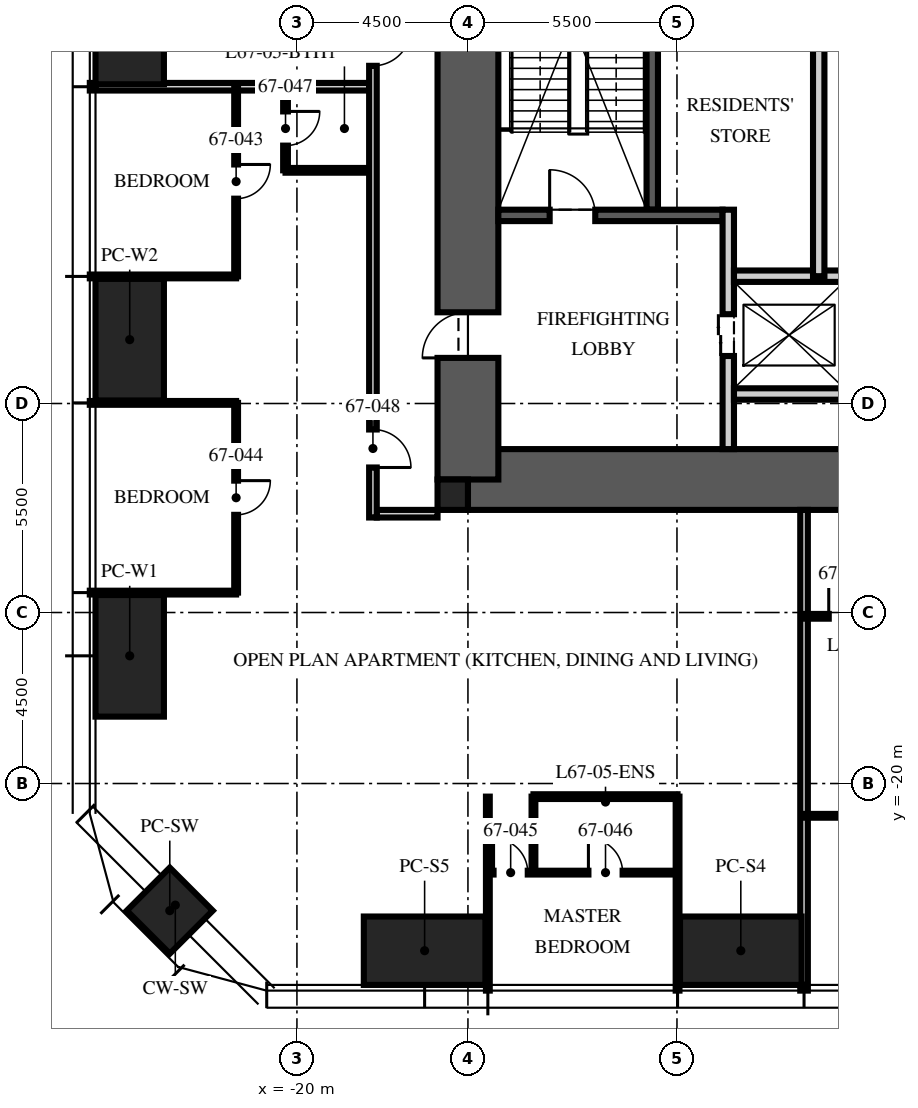
"""IFC4 building model, lengths in metres.
Left out: names, types, materials, properties, quantities, classifications, styles, units other than length and angle.
Written with IfcOpenShell. Run it as: python <this file> out.ifc"""

import sys

from ifc_helpers import new_model, si_unit, direction, frame, frame_2d, origin, origin_2d, place, context, subcontext, project, spatial, rectangle, hollow_rectangle, extrude, element, fill, save


model = new_model("IFC4")
c1 = context("Model", 3, precision=1e-05, world=origin(), true_north=direction((0.0, 1.0)))
c2 = subcontext(c1, "Body", "Model", "MODEL_VIEW")
j1 = project(units=[si_unit("LENGTHUNIT", "METRE"), si_unit("PLANEANGLEUNIT", "RADIAN")], contexts=[c1])
p1 = place(None, origin())
s1 = spatial("IfcSite", under=j1, at=p1, CompositionType="ELEMENT")
p2 = place(p1, origin())
s2 = spatial("IfcBuilding", under=s1, at=p2, CompositionType="ELEMENT")
p3 = place(p2, frame((0.0, 0.0, 267.0)))
s3 = spatial("IfcBuildingStorey", under=s2, at=p3, CompositionType="ELEMENT", Elevation=267.0)
p4 = place(p3, frame((-15.5, -12.0, -0.25), z_axis=(0.0, 0.0, 1.0), x_axis=(1.0, 0.0, 0.0)))
e1 = element("IfcWall", 1, at=p4, inside=s3, PredefinedType="SHEAR", context=c2, shape_type="SweptSolid", body=[
    extrude(rectangle(XDim=31.0, YDim=1.6, at=frame_2d((15.5, 0.0))), origin(), (0.0, 0.0, 1.0), 3.75),
])
p5 = place(p3, frame((-15.5, -12.0, -0.25), z_axis=(0.0, 0.0, 1.0), x_axis=(0.0, 1.0, 0.0)))
e2 = element("IfcWall", 2, at=p5, inside=s3, PredefinedType="SHEAR", context=c2, shape_type="SweptSolid", body=[
    extrude(rectangle(XDim=24.0, YDim=1.6, at=frame_2d((12.0, 0.0))), origin(), (0.0, 0.0, 1.0), 3.75),
])
p6 = place(p5, frame((3.2, 0.0, 0.25)))
e3 = element("IfcOpeningElement", 3, at=p6, cuts=e2, PredefinedType="OPENING", context=c2, shape_type="SweptSolid", body=[
    extrude(rectangle(XDim=1.2, YDim=2.1, at=frame_2d((0.6, 1.05))), frame((0.0, 0.81, 0.0), z_axis=(0.0, -1.0, 0.0), x_axis=(1.0, 0.0, 0.0)), (0.0, 0.0, 1.0), 1.62),
])
p7 = place(p5, frame((19.3, 0.0, 0.25)))
e4 = element("IfcOpeningElement", 4, at=p7, cuts=e2, PredefinedType="OPENING", context=c2, shape_type="SweptSolid", body=[
    extrude(rectangle(XDim=1.8, YDim=2.1, at=frame_2d((0.9, 1.05))), frame((0.0, 0.81, 0.0), z_axis=(0.0, -1.0, 0.0), x_axis=(1.0, 0.0, 0.0)), (0.0, 0.0, 1.0), 1.62),
])
p8 = place(p3, frame((-15.9, -12.4, -0.25), z_axis=(0.0, 0.0, 1.0), x_axis=(1.0, 0.0, 0.0)))
e5 = element("IfcColumn", 5, at=p8, inside=s3, PredefinedType="COLUMN", context=c2, shape_type="SweptSolid", body=[
    extrude(rectangle(XDim=0.8, YDim=0.8, at=origin_2d()), origin(), (0.0, 0.0, 1.0), 3.75),
])
for number, where, z_axis, x_axis in (
    (6, (-8.32, -24.4, 0.0), (0.0, 0.0, 1.0), (1.0, 0.0, 0.0)),
    (7, (-16.64, -24.4, 0.0), (0.0, 0.0, 1.0), (1.0, 0.0, 0.0)),
    (8, (-24.4, -16.64, 0.0), (0.0, 0.0, 1.0), (0.0, 1.0, 0.0)),
    (9, (-24.4, -8.32, 0.0), (0.0, 0.0, 1.0), (0.0, 1.0, 0.0)),
    (10, (-24.4, 0.0, 0.0), (0.0, 0.0, 1.0), (0.0, 1.0, 0.0)),
):
    element("IfcColumn", number, at=place(p3, frame(where, z_axis=z_axis, x_axis=x_axis)), inside=s3, PredefinedType="COLUMN", context=c2, shape_type="SweptSolid", body=[
        extrude(hollow_rectangle(XDim=3.2, YDim=1.8, WallThickness=0.14, at=origin_2d()), origin(), (0.0, 0.0, 1.0), 3.75),
    ])
p9 = place(p3, frame((-23.346, -23.346, 0.0), z_axis=(0.0, 0.0, 1.0), x_axis=(0.707106781187, -0.707106781187, 0.0)))
e11 = element("IfcColumn", 11, at=p9, inside=s3, PredefinedType="COLUMN", context=c2, shape_type="SweptSolid", body=[
    extrude(hollow_rectangle(XDim=1.6, YDim=1.6, WallThickness=0.1, at=origin_2d()), origin(), (0.0, 0.0, 1.0), 3.75),
])
p10 = place(p3, frame((-10.65, -4.9, 0.0), z_axis=(0.0, 0.0, 1.0), x_axis=(0.0, 1.0, 0.0)))
e12 = element("IfcWall", 12, at=p10, inside=s3, PredefinedType="SOLIDWALL", context=c2, shape_type="SweptSolid", body=[
    extrude(rectangle(XDim=10.1, YDim=0.3, at=frame_2d((5.05, 0.0))), origin(), (0.0, 0.0, 1.0), 3.5),
])
p11 = place(p3, frame((-14.7, -5.05, 0.0), z_axis=(0.0, 0.0, 1.0), x_axis=(1.0, 0.0, 0.0)))
e13 = element("IfcWall", 13, at=p11, inside=s3, PredefinedType="SOLIDWALL", context=c2, shape_type="SweptSolid", body=[
    extrude(rectangle(XDim=5.9, YDim=0.3, at=frame_2d((2.95, 0.0))), origin(), (0.0, 0.0, 1.0), 3.5),
])
p12 = place(p11, frame((1.35, 0.0, 0.0)))
e14 = element("IfcOpeningElement", 14, at=p12, cuts=e13, PredefinedType="OPENING", context=c2, shape_type="SweptSolid", body=[
    extrude(rectangle(XDim=1.2, YDim=2.1, at=frame_2d((0.6, 1.05))), frame((0.0, 0.16, 0.0), z_axis=(0.0, -1.0, 0.0), x_axis=(1.0, 0.0, 0.0)), (0.0, 0.0, 1.0), 0.32),
])
p13 = place(p3, frame((-8.65, -11.2, 0.0), z_axis=(0.0, 0.0, 1.0), x_axis=(0.0, 1.0, 0.0)))
e15 = element("IfcWall", 15, at=p13, inside=s3, PredefinedType="PARTITIONING", context=c2, shape_type="SweptSolid", body=[
    extrude(rectangle(XDim=6.3, YDim=0.3, at=frame_2d((3.15, 0.0))), origin(), (0.0, 0.0, 1.0), 3.5),
])
p14 = place(p13, frame((2.45, 0.0, 0.0)))
e16 = element("IfcOpeningElement", 16, at=p14, cuts=e15, PredefinedType="OPENING", context=c2, shape_type="SweptSolid", body=[
    extrude(rectangle(XDim=1.1, YDim=2.1, at=frame_2d((0.55, 1.05))), frame((0.0, 0.16, 0.0), z_axis=(0.0, -1.0, 0.0), x_axis=(1.0, 0.0, 0.0)), (0.0, 0.0, 1.0), 0.32),
])
p15 = place(p3, frame((-8.5, -6.65, 0.0), z_axis=(0.0, 0.0, 1.0), x_axis=(1.0, 0.0, 0.0)))
e17 = element("IfcWall", 17, at=p15, inside=s3, PredefinedType="PARTITIONING", context=c2, shape_type="SweptSolid", body=[
    extrude(rectangle(XDim=17.0, YDim=0.3, at=frame_2d((8.5, 0.0))), origin(), (0.0, 0.0, 1.0), 3.5),
])
p16 = place(p15, frame((7.8, 0.0, 0.0)))
e18 = element("IfcOpeningElement", 18, at=p16, cuts=e17, PredefinedType="OPENING", context=c2, shape_type="SweptSolid", body=[
    extrude(rectangle(XDim=1.3, YDim=2.4, at=frame_2d((0.65, 1.2))), frame((0.0, 0.16, 0.0), z_axis=(0.0, -1.0, 0.0), x_axis=(1.0, 0.0, 0.0)), (0.0, 0.0, 1.0), 0.32),
])
p17 = place(p15, frame((5.65, 0.0, 0.0)))
e19 = element("IfcOpeningElement", 19, at=p17, cuts=e17, PredefinedType="OPENING", context=c2, shape_type="SweptSolid", body=[
    extrude(rectangle(XDim=0.9, YDim=2.1, at=frame_2d((0.45, 1.05))), frame((0.0, 0.16, 0.0), z_axis=(0.0, -1.0, 0.0), x_axis=(1.0, 0.0, 0.0)), (0.0, 0.0, 1.0), 0.32),
])
p18 = place(p15, frame((10.4, 0.0, 0.0)))
e20 = element("IfcOpeningElement", 20, at=p18, cuts=e17, PredefinedType="OPENING", context=c2, shape_type="SweptSolid", body=[
    extrude(rectangle(XDim=0.9, YDim=2.1, at=frame_2d((0.45, 1.05))), frame((0.0, 0.16, 0.0), z_axis=(0.0, -1.0, 0.0), x_axis=(1.0, 0.0, 0.0)), (0.0, 0.0, 1.0), 0.32),
])
p19 = place(p3, frame((-8.5, -9.75, 0.0), z_axis=(0.0, 0.0, 1.0), x_axis=(1.0, 0.0, 0.0)))
e21 = element("IfcWall", 21, at=p19, inside=s3, PredefinedType="PARTITIONING", context=c2, shape_type="SweptSolid", body=[
    extrude(rectangle(XDim=2.9, YDim=0.3, at=frame_2d((1.45, 0.0))), origin(), (0.0, 0.0, 1.0), 3.5),
])
p20 = place(p3, frame((-6.27, -6.65, 0.0), z_axis=(0.0, 0.0, 1.0), x_axis=(0.0, 1.0, 0.0)))
e22 = element("IfcWall", 22, at=p20, inside=s3, PredefinedType="PARTITIONING", context=c2, shape_type="SweptSolid", body=[
    extrude(rectangle(XDim=7.45, YDim=0.3, at=frame_2d((3.725, 0.0))), origin(), (0.0, 0.0, 1.0), 3.5),
])
p21 = place(p3, frame((-16.3, -12.9, 0.0), z_axis=(0.0, 0.0, 1.0), x_axis=(-1.0, 0.0, 0.0)))
e23 = element("IfcWall", 23, at=p21, inside=s3, PredefinedType="PARTITIONING", context=c2, shape_type="SweptSolid", body=[
    extrude(rectangle(XDim=1.6, YDim=0.2, at=frame_2d((0.8, 0.0))), origin(), (0.0, 0.0, 1.0), 2.3),
])
p22 = place(p3, frame((-18.1, -1.664, 0.0), z_axis=(0.0, 0.0, 1.0), x_axis=(-1.0, 0.0, 0.0)))
e24 = element("IfcWall", 24, at=p22, inside=s3, PredefinedType="PARTITIONING", context=c2, shape_type="SweptSolid", body=[
    extrude(rectangle(XDim=7.35, YDim=0.2, at=frame_2d((3.675, 0.0))), origin(), (0.0, 0.0, 1.0), 2.91),
])
for number, where, z_axis, x_axis in (
    (25, (-21.6, -6.656, 0.0), (0.0, 0.0, 1.0), (-1.0, 0.0, 0.0)),
    (26, (-21.6, -9.984, 0.0), (0.0, 0.0, 1.0), (-1.0, 0.0, 0.0)),
    (27, (-21.6, -14.976, 0.0), (0.0, 0.0, 1.0), (-1.0, 0.0, 0.0)),
):
    element("IfcWall", number, at=place(p3, frame(where, z_axis=z_axis, x_axis=x_axis)), inside=s3, PredefinedType="PARTITIONING", context=c2, shape_type="SweptSolid", body=[
        extrude(rectangle(XDim=3.85, YDim=0.1, at=frame_2d((1.925, 0.0))), origin(), (0.0, 0.0, 1.0), 2.91),
    ])
for number, where, z_axis, x_axis in (
    (28, (-14.976, -20.345, 0.0), (0.0, 0.0, 1.0), (0.0, -1.0, 0.0)),
    (29, (-9.984, -20.345, 0.0), (0.0, 0.0, 1.0), (0.0, -1.0, 0.0)),
):
    element("IfcWall", number, at=place(p3, frame(where, z_axis=z_axis, x_axis=x_axis)), inside=s3, PredefinedType="PARTITIONING", context=c2, shape_type="SweptSolid", body=[
        extrude(rectangle(XDim=5.105, YDim=0.1, at=frame_2d((2.552, 0.0))), origin(), (0.0, 0.0, 1.0), 2.91),
    ])
p23 = place(p3, frame((-6.656, -12.8, 0.0), z_axis=(0.0, 0.0, 1.0), x_axis=(0.0, -1.0, 0.0)))
e30 = element("IfcWall", 30, at=p23, inside=s3, PredefinedType="PARTITIONING", context=c2, shape_type="SweptSolid", body=[
    extrude(rectangle(XDim=12.65, YDim=0.2, at=frame_2d((6.325, 0.0))), origin(), (0.0, 0.0, 1.0), 2.91),
])
p24 = place(p3, frame((-21.6, -1.664, 0.0), z_axis=(0.0, 0.0, 1.0), x_axis=(0.0, -1.0, 0.0)))
e31 = element("IfcWall", 31, at=p24, inside=s3, PredefinedType="PARTITIONING", context=c2, shape_type="SweptSolid", body=[
    extrude(rectangle(XDim=4.992, YDim=0.1, at=frame_2d((2.496, 0.0))), origin(), (0.0, 0.0, 1.0), 2.81),
])
p25 = place(p24, frame((2.046, 0.0, 0.0)))
e32 = element("IfcOpeningElement", 32, at=p25, cuts=e31, PredefinedType="OPENING", context=c2, shape_type="SweptSolid", body=[
    extrude(rectangle(XDim=0.9, YDim=2.1, at=frame_2d((0.45, 1.05))), frame((0.0, 0.06, 0.0), z_axis=(0.0, -1.0, 0.0), x_axis=(1.0, 0.0, 0.0)), (0.0, 0.0, 1.0), 0.12),
])
p26 = place(p3, frame((-21.6, -9.984, 0.0), z_axis=(0.0, 0.0, 1.0), x_axis=(0.0, -1.0, 0.0)))
e33 = element("IfcWall", 33, at=p26, inside=s3, PredefinedType="PARTITIONING", context=c2, shape_type="SweptSolid", body=[
    extrude(rectangle(XDim=4.992, YDim=0.1, at=frame_2d((2.496, 0.0))), origin(), (0.0, 0.0, 1.0), 2.81),
])
p27 = place(p26, frame((2.046, 0.0, 0.0)))
e34 = element("IfcOpeningElement", 34, at=p27, cuts=e33, PredefinedType="OPENING", context=c2, shape_type="SweptSolid", body=[
    extrude(rectangle(XDim=0.9, YDim=2.1, at=frame_2d((0.45, 1.05))), frame((0.0, 0.06, 0.0), z_axis=(0.0, -1.0, 0.0), x_axis=(1.0, 0.0, 0.0)), (0.0, 0.0, 1.0), 0.12),
])
p28 = place(p3, frame((-14.976, -22.345, 0.0), z_axis=(0.0, 0.0, 1.0), x_axis=(1.0, 0.0, 0.0)))
e35 = element("IfcWall", 35, at=p28, inside=s3, PredefinedType="PARTITIONING", context=c2, shape_type="SweptSolid", body=[
    extrude(rectangle(XDim=4.992, YDim=0.1, at=frame_2d((2.496, 0.0))), origin(), (0.0, 0.0, 1.0), 2.81),
])
p29 = place(p28, frame((0.15, 0.0, 0.0)))
e36 = element("IfcOpeningElement", 36, at=p29, cuts=e35, PredefinedType="OPENING", context=c2, shape_type="SweptSolid", body=[
    extrude(rectangle(XDim=0.9, YDim=2.1, at=frame_2d((0.45, 1.05))), frame((0.0, 0.06, 0.0), z_axis=(0.0, -1.0, 0.0), x_axis=(1.0, 0.0, 0.0)), (0.0, 0.0, 1.0), 0.12),
])
p30 = place(p28, frame((2.646, 0.0, 0.0)))
e37 = element("IfcOpeningElement", 37, at=p30, cuts=e35, PredefinedType="OPENING", context=c2, shape_type="SweptSolid", body=[
    extrude(rectangle(XDim=0.9, YDim=2.1, at=frame_2d((0.45, 1.05))), frame((0.0, 0.06, 0.0), z_axis=(0.0, -1.0, 0.0), x_axis=(1.0, 0.0, 0.0)), (0.0, 0.0, 1.0), 0.12),
])
p31 = place(p3, frame((-13.776, -20.345, 0.0), z_axis=(0.0, 0.0, 1.0), x_axis=(0.0, -1.0, 0.0)))
e38 = element("IfcWall", 38, at=p31, inside=s3, PredefinedType="PARTITIONING", context=c2, shape_type="SweptSolid", body=[
    extrude(rectangle(XDim=2.0, YDim=0.1, at=frame_2d((1.0, 0.0))), origin(), (0.0, 0.0, 1.0), 3.5),
])
p32 = place(p3, frame((-13.776, -20.345, 0.0), z_axis=(0.0, 0.0, 1.0), x_axis=(1.0, 0.0, 0.0)))
e39 = element("IfcWall", 39, at=p32, inside=s3, PredefinedType="PARTITIONING", context=c2, shape_type="SweptSolid", body=[
    extrude(rectangle(XDim=3.792, YDim=0.125, at=frame_2d((1.896, 0.0))), origin(), (0.0, 0.0, 1.0), 2.81),
])
p33 = place(p3, frame((-20.3, -1.664, 0.0), z_axis=(0.0, 0.0, 1.0), x_axis=(0.0, -1.0, 0.0)))
e40 = element("IfcWall", 40, at=p33, inside=s3, PredefinedType="PARTITIONING", context=c2, shape_type="SweptSolid", body=[
    extrude(rectangle(XDim=2.2, YDim=0.125, at=frame_2d((1.1, 0.0))), origin(), (0.0, 0.0, 1.0), 3.5),
])
p34 = place(p33, frame((0.65, 0.0, 0.0)))
e41 = element("IfcOpeningElement", 41, at=p34, cuts=e40, PredefinedType="OPENING", context=c2, shape_type="SweptSolid", body=[
    extrude(rectangle(XDim=0.9, YDim=2.1, at=frame_2d((0.45, 1.05))), frame((0.0, 0.073, 0.0), z_axis=(0.0, -1.0, 0.0), x_axis=(1.0, 0.0, 0.0)), (0.0, 0.0, 1.0), 0.145),
])
p35 = place(p3, frame((-18.1, -3.864, 0.0), z_axis=(0.0, 0.0, 1.0), x_axis=(-1.0, 0.0, 0.0)))
e42 = element("IfcWall", 42, at=p35, inside=s3, PredefinedType="PARTITIONING", context=c2, shape_type="SweptSolid", body=[
    extrude(rectangle(XDim=2.2, YDim=0.125, at=frame_2d((1.1, 0.0))), origin(), (0.0, 0.0, 1.0), 3.5),
])
p36 = place(p3, frame((-6.656, -20.85, 0.0), z_axis=(0.0, 0.0, 1.0), x_axis=(1.0, 0.0, 0.0)))
e43 = element("IfcWall", 43, at=p36, inside=s3, PredefinedType="PARTITIONING", context=c2, shape_type="SweptSolid", body=[
    extrude(rectangle(XDim=4.992, YDim=0.1, at=frame_2d((2.496, 0.0))), origin(), (0.0, 0.0, 1.0), 2.81),
])
p37 = place(p36, frame((2.046, 0.0, 0.0)))
e44 = element("IfcOpeningElement", 44, at=p37, cuts=e43, PredefinedType="OPENING", context=c2, shape_type="SweptSolid", body=[
    extrude(rectangle(XDim=0.9, YDim=2.1, at=frame_2d((0.45, 1.05))), frame((0.0, 0.06, 0.0), z_axis=(0.0, -1.0, 0.0), x_axis=(1.0, 0.0, 0.0)), (0.0, 0.0, 1.0), 0.12),
])
p38 = place(p3, frame((-6.656, -15.6, 0.0), z_axis=(0.0, 0.0, 1.0), x_axis=(1.0, 0.0, 0.0)))
e45 = element("IfcWall", 45, at=p38, inside=s3, PredefinedType="PARTITIONING", context=c2, shape_type="SweptSolid", body=[
    extrude(rectangle(XDim=6.2, YDim=0.125, at=frame_2d((3.1, 0.0))), origin(), (0.0, 0.0, 1.0), 2.81),
])
p39 = place(p38, frame((0.65, 0.0, 0.0)))
e46 = element("IfcOpeningElement", 46, at=p39, cuts=e45, PredefinedType="OPENING", context=c2, shape_type="SweptSolid", body=[
    extrude(rectangle(XDim=0.9, YDim=2.1, at=frame_2d((0.45, 1.05))), frame((0.0, 0.073, 0.0), z_axis=(0.0, -1.0, 0.0), x_axis=(1.0, 0.0, 0.0)), (0.0, 0.0, 1.0), 0.145),
])
p40 = place(p38, frame((2.85, 0.0, 0.0)))
e47 = element("IfcOpeningElement", 47, at=p40, cuts=e45, PredefinedType="OPENING", context=c2, shape_type="SweptSolid", body=[
    extrude(rectangle(XDim=0.9, YDim=2.1, at=frame_2d((0.45, 1.05))), frame((0.0, 0.073, 0.0), z_axis=(0.0, -1.0, 0.0), x_axis=(1.0, 0.0, 0.0)), (0.0, 0.0, 1.0), 0.145),
])
p41 = place(p38, frame((4.85, 0.0, 0.0)))
e48 = element("IfcOpeningElement", 48, at=p41, cuts=e45, PredefinedType="OPENING", context=c2, shape_type="SweptSolid", body=[
    extrude(rectangle(XDim=0.9, YDim=2.1, at=frame_2d((0.45, 1.05))), frame((0.0, 0.073, 0.0), z_axis=(0.0, -1.0, 0.0), x_axis=(1.0, 0.0, 0.0)), (0.0, 0.0, 1.0), 0.145),
])
p42 = place(p3, frame((-18.0, 13.0, 0.0), z_axis=(0.0, 0.0, 1.0), x_axis=(0.0, -1.0, 0.0)))
e49 = element("IfcWall", 49, at=p42, inside=s3, PredefinedType="PARTITIONING", context=c2, shape_type="SweptSolid", body=[
    extrude(rectangle(XDim=26.0, YDim=0.2, at=frame_2d((13.0, 0.0))), origin(), (0.0, 0.0, 1.0), 2.6),
])
p43 = place(p42, frame((4.6, 0.0, 0.0)))
e50 = element("IfcOpeningElement", 50, at=p43, cuts=e49, PredefinedType="OPENING", context=c2, shape_type="SweptSolid", body=[
    extrude(rectangle(XDim=1.0, YDim=2.2, at=frame_2d((0.5, 1.1))), frame((0.0, 0.11, 0.0), z_axis=(0.0, -1.0, 0.0), x_axis=(1.0, 0.0, 0.0)), (0.0, 0.0, 1.0), 0.22),
])
p44 = place(p42, frame((13.114, 0.0, 0.0)))
e51 = element("IfcOpeningElement", 51, at=p44, cuts=e49, PredefinedType="OPENING", context=c2, shape_type="SweptSolid", body=[
    extrude(rectangle(XDim=1.0, YDim=2.2, at=frame_2d((0.5, 1.1))), frame((0.0, 0.11, 0.0), z_axis=(0.0, -1.0, 0.0), x_axis=(1.0, 0.0, 0.0)), (0.0, 0.0, 1.0), 0.22),
])
p45 = place(p42, frame((23.684, 0.0, 0.0)))
e52 = element("IfcOpeningElement", 52, at=p45, cuts=e49, PredefinedType="OPENING", context=c2, shape_type="SweptSolid", body=[
    extrude(rectangle(XDim=1.0, YDim=2.2, at=frame_2d((0.5, 1.1))), frame((0.0, 0.11, 0.0), z_axis=(0.0, -1.0, 0.0), x_axis=(1.0, 0.0, 0.0)), (0.0, 0.0, 1.0), 0.22),
])
p46 = place(p12, origin())
e53 = element("IfcDoor", 53, at=p46, inside=s3, OperationType="SINGLE_SWING_LEFT", PredefinedType="DOOR", context=c2, shape_type="SweptSolid", body=[
    extrude(rectangle(XDim=1.2, YDim=2.1, at=frame_2d((0.6, 1.05))), frame((0.0, 0.025, 0.0), z_axis=(0.0, -1.0, 0.0), x_axis=(1.0, 0.0, 0.0)), (0.0, 0.0, 1.0), 0.05),
])
fill(e14, e53)
p47 = place(p6, origin())
e54 = element("IfcDoor", 54, at=p47, inside=s3, OperationType="SINGLE_SWING_LEFT", PredefinedType="DOOR", context=c2, shape_type="SweptSolid", body=[
    extrude(rectangle(XDim=1.2, YDim=2.1, at=frame_2d((0.6, 1.05))), frame((0.0, 0.025, 0.0), z_axis=(0.0, -1.0, 0.0), x_axis=(1.0, 0.0, 0.0)), (0.0, 0.0, 1.0), 0.05),
])
fill(e3, e54)
p48 = place(p14, origin())
e55 = element("IfcDoor", 55, at=p48, inside=s3, OperationType="DOUBLE_DOOR_SLIDING", PredefinedType="DOOR", context=c2, shape_type="SweptSolid", body=[
    extrude(rectangle(XDim=1.1, YDim=2.1, at=frame_2d((0.55, 1.05))), frame((0.0, 0.025, 0.0), z_axis=(0.0, -1.0, 0.0), x_axis=(1.0, 0.0, 0.0)), (0.0, 0.0, 1.0), 0.05),
])
fill(e16, e55)
p49 = place(p44, origin())
e56 = element("IfcDoor", 56, at=p49, inside=s3, OperationType="SINGLE_SWING_LEFT", PredefinedType="DOOR", context=c2, shape_type="SweptSolid", body=[
    extrude(rectangle(XDim=1.0, YDim=2.2, at=frame_2d((0.5, 1.1))), frame((0.0, 0.025, 0.0), z_axis=(0.0, -1.0, 0.0), x_axis=(1.0, 0.0, 0.0)), (0.0, 0.0, 1.0), 0.05),
])
fill(e51, e56)
p50 = place(p25, origin())
e57 = element("IfcDoor", 57, at=p50, inside=s3, OperationType="SINGLE_SWING_LEFT", PredefinedType="DOOR", context=c2, shape_type="SweptSolid", body=[
    extrude(rectangle(XDim=0.9, YDim=2.1, at=frame_2d((0.45, 1.05))), frame((0.0, 0.025, 0.0), z_axis=(0.0, -1.0, 0.0), x_axis=(1.0, 0.0, 0.0)), (0.0, 0.0, 1.0), 0.05),
])
fill(e32, e57)
p51 = place(p27, origin())
e58 = element("IfcDoor", 58, at=p51, inside=s3, OperationType="SINGLE_SWING_LEFT", PredefinedType="DOOR", context=c2, shape_type="SweptSolid", body=[
    extrude(rectangle(XDim=0.9, YDim=2.1, at=frame_2d((0.45, 1.05))), frame((0.0, 0.025, 0.0), z_axis=(0.0, -1.0, 0.0), x_axis=(1.0, 0.0, 0.0)), (0.0, 0.0, 1.0), 0.05),
])
fill(e34, e58)
p52 = place(p29, origin())
e59 = element("IfcDoor", 59, at=p52, inside=s3, OperationType="SINGLE_SWING_LEFT", PredefinedType="DOOR", context=c2, shape_type="SweptSolid", body=[
    extrude(rectangle(XDim=0.9, YDim=2.1, at=frame_2d((0.45, 1.05))), frame((0.0, 0.025, 0.0), z_axis=(0.0, -1.0, 0.0), x_axis=(1.0, 0.0, 0.0)), (0.0, 0.0, 1.0), 0.05),
])
fill(e36, e59)
p53 = place(p30, origin())
e60 = element("IfcDoor", 60, at=p53, inside=s3, OperationType="SINGLE_SWING_LEFT", PredefinedType="DOOR", context=c2, shape_type="SweptSolid", body=[
    extrude(rectangle(XDim=0.9, YDim=2.1, at=frame_2d((0.45, 1.05))), frame((0.0, 0.025, 0.0), z_axis=(0.0, -1.0, 0.0), x_axis=(1.0, 0.0, 0.0)), (0.0, 0.0, 1.0), 0.05),
])
fill(e37, e60)
p54 = place(p34, origin())
e61 = element("IfcDoor", 61, at=p54, inside=s3, OperationType="SINGLE_SWING_LEFT", PredefinedType="DOOR", context=c2, shape_type="SweptSolid", body=[
    extrude(rectangle(XDim=0.9, YDim=2.1, at=frame_2d((0.45, 1.05))), frame((0.0, 0.025, 0.0), z_axis=(0.0, -1.0, 0.0), x_axis=(1.0, 0.0, 0.0)), (0.0, 0.0, 1.0), 0.05),
])
fill(e41, e61)
p55 = place(p45, origin())
e62 = element("IfcDoor", 62, at=p55, inside=s3, OperationType="SINGLE_SWING_RIGHT", PredefinedType="DOOR", context=c2, shape_type="SweptSolid", body=[
    extrude(rectangle(XDim=1.0, YDim=2.2, at=frame_2d((0.5, 1.1))), frame((0.0, 0.025, 0.0), z_axis=(0.0, -1.0, 0.0), x_axis=(1.0, 0.0, 0.0)), (0.0, 0.0, 1.0), 0.05),
])
fill(e52, e62)
p56 = place(p39, origin())
e63 = element("IfcDoor", 63, at=p56, inside=s3, OperationType="SINGLE_SWING_LEFT", PredefinedType="DOOR", context=c2, shape_type="SweptSolid", body=[
    extrude(rectangle(XDim=0.9, YDim=2.1, at=frame_2d((0.45, 1.05))), frame((0.0, 0.025, 0.0), z_axis=(0.0, -1.0, 0.0), x_axis=(1.0, 0.0, 0.0)), (0.0, 0.0, 1.0), 0.05),
])
fill(e46, e63)
save(model, sys.argv[1])
